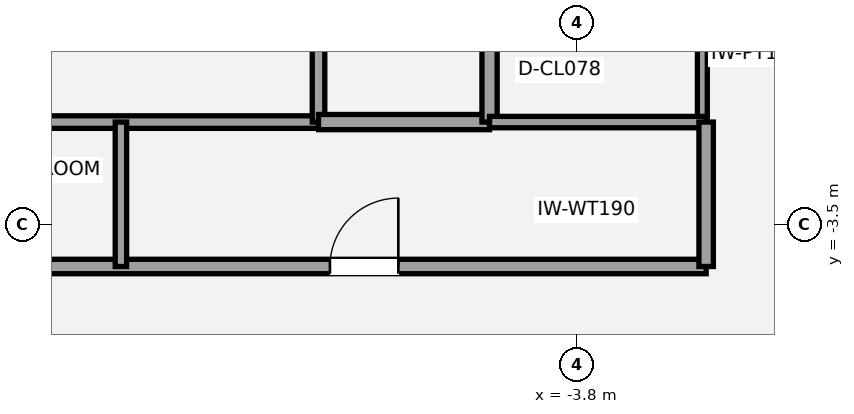
"""IFC4 building model, lengths in metres.
Left out: names, types, materials, properties, quantities, classifications, styles, units other than length and angle.
Written with IfcOpenShell. Run it as: python <this file> out.ifc"""

import sys

from ifc_helpers import new_model, si_unit, direction, frame, frame_2d, origin, place, context, subcontext, project, spatial, rectangle, extrude, element, fill, save


model = new_model("IFC4")
c1 = context("Model", 3, precision=1e-05, world=origin(), true_north=direction((0.0, 1.0)))
c2 = subcontext(c1, "Body", "Model", "MODEL_VIEW")
j1 = project(units=[si_unit("LENGTHUNIT", "METRE"), si_unit("PLANEANGLEUNIT", "RADIAN")], contexts=[c1])
p1 = place(None, origin())
s1 = spatial("IfcSite", under=j1, at=p1, CompositionType="ELEMENT")
p2 = place(p1, origin())
s2 = spatial("IfcBuilding", under=s1, at=p2, CompositionType="ELEMENT")
p3 = place(p2, frame((0.0, 0.0, 131.6)))
s3 = spatial("IfcBuildingStorey", under=s2, at=p3, CompositionType="ELEMENT", Elevation=131.6)
p4 = place(p3, frame((-13.45, -2.15, 0.0), z_axis=(0.0, 0.0, 1.0), x_axis=(1.0, 0.0, 0.0)))
e1 = element("IfcWall", 1, at=p4, inside=s3, PredefinedType="PARTITIONING", context=c2, shape_type="SweptSolid", body=[
    extrude(rectangle(XDim=6.25, YDim=0.165, at=frame_2d((3.125, 0.0))), origin(), (0.0, 0.0, 1.0), 3.26),
])
p5 = place(p3, frame((-7.2, -2.15, 0.0), z_axis=(0.0, 0.0, 1.0), x_axis=(0.0, 1.0, 0.0)))
e2 = element("IfcWall", 2, at=p5, inside=s3, PredefinedType="PARTITIONING", context=c2, shape_type="SweptSolid", body=[
    extrude(rectangle(XDim=3.3, YDim=0.165, at=frame_2d((1.65, 0.0))), origin(), (0.0, 0.0, 1.0), 2.713),
])
p6 = place(p3, frame((-7.2, -2.15, 0.0), z_axis=(0.0, 0.0, 1.0), x_axis=(1.0, 0.0, 0.0)))
e3 = element("IfcWall", 3, at=p6, inside=s3, PredefinedType="SOLIDWALL", context=c2, shape_type="SweptSolid", body=[
    extrude(rectangle(XDim=2.25, YDim=0.2, at=frame_2d((1.125, 0.0))), origin(), (0.0, 0.0, 1.0), 3.26),
])
p7 = place(p3, frame((-4.95, -2.15, 0.0), z_axis=(0.0, 0.0, 1.0), x_axis=(0.0, 1.0, 0.0)))
e4 = element("IfcWall", 4, at=p7, inside=s3, PredefinedType="SOLIDWALL", context=c2, shape_type="SweptSolid", body=[
    extrude(rectangle(XDim=3.3, YDim=0.2, at=frame_2d((1.65, 0.0))), origin(), (0.0, 0.0, 1.0), 2.713),
])
p8 = place(p7, frame((0.95, 0.0, 0.0)))
e5 = element("IfcOpeningElement", 5, at=p8, cuts=e4, PredefinedType="OPENING", context=c2, shape_type="SweptSolid", body=[
    extrude(rectangle(XDim=0.75, YDim=2.1, at=frame_2d((0.375, 1.05))), frame((0.0, 0.11, 0.0), z_axis=(0.0, -1.0, 0.0), x_axis=(1.0, 0.0, 0.0)), (0.0, 0.0, 1.0), 0.22),
])
p9 = place(p3, frame((-2.15, -2.15, 0.0), z_axis=(0.0, 0.0, 1.0), x_axis=(0.0, 1.0, 0.0)))
e6 = element("IfcWall", 6, at=p9, inside=s3, PredefinedType="PARTITIONING", context=c2, shape_type="SweptSolid", body=[
    extrude(rectangle(XDim=1.8, YDim=0.13, at=frame_2d((0.9, 0.0))), origin(), (0.0, 0.0, 1.0), 2.713),
])
p10 = place(p3, frame((-13.45, -4.05, 0.0), z_axis=(0.0, 0.0, 1.0), x_axis=(1.0, 0.0, 0.0)))
e7 = element("IfcWall", 7, at=p10, inside=s3, PredefinedType="PLUMBINGWALL", context=c2, shape_type="SweptSolid", body=[
    extrude(rectangle(XDim=11.35, YDim=0.19, at=frame_2d((5.675, 0.0))), origin(), (0.0, 0.0, 1.0), 2.713),
])
p11 = place(p10, frame((1.25, 0.0, 0.0)))
e8 = element("IfcOpeningElement", 8, at=p11, cuts=e7, PredefinedType="OPENING", context=c2, shape_type="SweptSolid", body=[
    extrude(rectangle(XDim=0.95, YDim=2.15, at=frame_2d((0.475, 1.075))), frame((0.0, 0.105, 0.0), z_axis=(0.0, -1.0, 0.0), x_axis=(1.0, 0.0, 0.0)), (0.0, 0.0, 1.0), 0.21),
])
p12 = place(p10, frame((6.4, 0.0, 0.0)))
e9 = element("IfcOpeningElement", 9, at=p12, cuts=e7, PredefinedType="OPENING", context=c2, shape_type="SweptSolid", body=[
    extrude(rectangle(XDim=0.9, YDim=2.1, at=frame_2d((0.45, 1.05))), frame((0.0, 0.105, 0.0), z_axis=(0.0, -1.0, 0.0), x_axis=(1.0, 0.0, 0.0)), (0.0, 0.0, 1.0), 0.21),
])
p13 = place(p3, frame((-4.95, -2.15, 0.0), z_axis=(0.0, 0.0, 1.0), x_axis=(1.0, 0.0, 0.0)))
e10 = element("IfcWall", 10, at=p13, inside=s3, PredefinedType="PLUMBINGWALL", context=c2, shape_type="SweptSolid", body=[
    extrude(rectangle(XDim=2.85, YDim=0.15, at=frame_2d((1.425, 0.0))), origin(), (0.0, 0.0, 1.0), 2.713),
])
p14 = place(p3, frame((-2.1, -4.05, 0.0), z_axis=(0.0, 0.0, 1.0), x_axis=(0.0, 1.0, 0.0)))
e11 = element("IfcWall", 11, at=p14, inside=s3, PredefinedType="PLUMBINGWALL", context=c2, shape_type="SweptSolid", body=[
    extrude(rectangle(XDim=1.9, YDim=0.19, at=frame_2d((0.95, 0.0))), origin(), (0.0, 0.0, 1.0), 2.713),
])
p15 = place(p3, frame((-9.8, -4.05, 0.0), z_axis=(0.0, 0.0, 1.0), x_axis=(0.0, 1.0, 0.0)))
e12 = element("IfcWall", 12, at=p15, inside=s3, PredefinedType="PLUMBINGWALL", context=c2, shape_type="SweptSolid", body=[
    extrude(rectangle(XDim=1.9, YDim=0.15, at=frame_2d((0.95, 0.0))), origin(), (0.0, 0.0, 1.0), 3.26),
])
p16 = place(p12, origin())
e13 = element("IfcDoor", 13, at=p16, inside=s3, OperationType="SINGLE_SWING_RIGHT", PredefinedType="DOOR", context=c2, shape_type="SweptSolid", body=[
    extrude(rectangle(XDim=0.9, YDim=2.1, at=frame_2d((0.45, 1.05))), frame((0.0, 0.025, 0.0), z_axis=(0.0, -1.0, 0.0), x_axis=(1.0, 0.0, 0.0)), (0.0, 0.0, 1.0), 0.05),
])
fill(e9, e13)
save(model, sys.argv[1])
